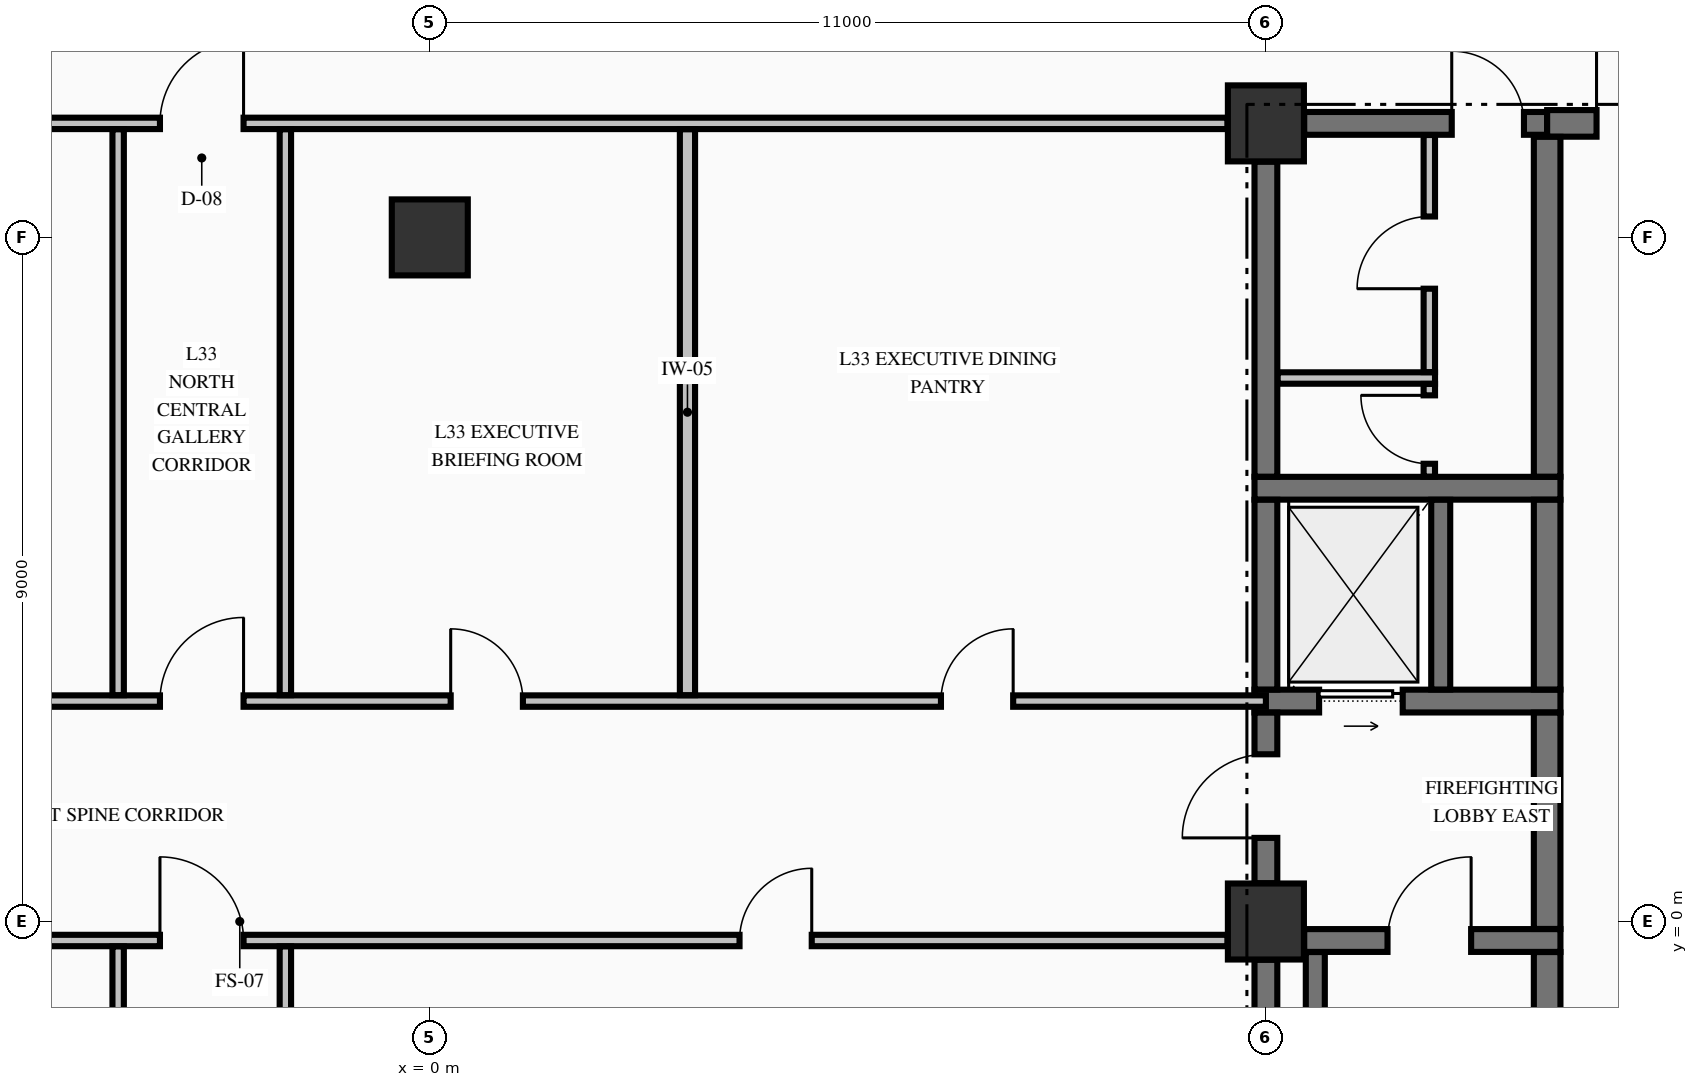
"""IFC4 building model, lengths in metres.
Left out: names, types, materials, properties, quantities, classifications, styles, units other than length and angle.
Written with IfcOpenShell. Run it as: python <this file> out.ifc"""

import sys

from ifc_helpers import new_model, si_unit, direction, frame, frame_2d, origin, origin_2d, place, context, subcontext, project, spatial, rectangle, extrude, element, fill, save


model = new_model("IFC4")
c1 = context("Model", 3, precision=1e-05, world=origin(), true_north=direction((0.0, 1.0)))
c2 = subcontext(c1, "Body", "Model", "MODEL_VIEW")
j1 = project(units=[si_unit("LENGTHUNIT", "METRE"), si_unit("PLANEANGLEUNIT", "RADIAN")], contexts=[c1])
p1 = place(None, origin())
s1 = spatial("IfcSite", under=j1, at=p1, CompositionType="ELEMENT")
p2 = place(p1, origin())
s2 = spatial("IfcBuilding", under=s1, at=p2, CompositionType="ELEMENT")
p3 = place(p2, frame((0.0, 0.0, 132.06)))
s3 = spatial("IfcBuildingStorey", under=s2, at=p3, CompositionType="ELEMENT", Elevation=132.06)
for number, where, z_axis, x_axis in (
    (1, (11.0, 0.0, -0.25), (0.0, 0.0, 1.0), (1.0, 0.0, 0.0)),
    (2, (11.0, 10.5, -0.25), (0.0, 0.0, 1.0), (1.0, 0.0, 0.0)),
    (3, (0.0, 9.0, -0.25), (0.0, 0.0, 1.0), (1.0, 0.0, 0.0)),
):
    element("IfcColumn", number, at=place(p3, frame(where, z_axis=z_axis, x_axis=x_axis)), inside=s3, PredefinedType="COLUMN", context=c2, shape_type="SweptSolid", body=[
        extrude(rectangle(XDim=1.0, YDim=1.0, at=origin_2d()), origin(), (0.0, 0.0, 1.0), 3.57),
    ])
p4 = place(p3, frame((11.504, -0.25, 0.0), z_axis=(0.0, 0.0, 1.0), x_axis=(1.0, 0.0, 0.0)))
e4 = element("IfcWall", 4, at=p4, inside=s3, PredefinedType="SHEAR", context=c2, shape_type="SweptSolid", body=[
    extrude(rectangle(XDim=3.371, YDim=0.3, at=frame_2d((1.686, 0.0))), origin(), (0.0, 0.0, 1.0), 3.32),
])
p5 = place(p4, frame((1.096, 0.0, 0.0)))
e5 = element("IfcOpeningElement", 5, at=p5, cuts=e4, PredefinedType="OPENING", context=c2, shape_type="SweptSolid", body=[
    extrude(rectangle(XDim=1.1, YDim=2.15, at=frame_2d((0.55, 1.075))), frame((0.0, 0.16, 0.0), z_axis=(0.0, -1.0, 0.0), x_axis=(1.0, 0.0, 0.0)), (0.0, 0.0, 1.0), 0.32),
])
p6 = place(p3, frame((10.85, 2.9, 0.0), z_axis=(0.0, 0.0, 1.0), x_axis=(1.0, 0.0, 0.0)))
e6 = element("IfcWall", 6, at=p6, inside=s3, PredefinedType="SHEAR", context=c2, shape_type="SweptSolid", body=[
    extrude(rectangle(XDim=4.025, YDim=0.3, at=frame_2d((2.012, 0.0))), origin(), (0.0, 0.0, 1.0), 3.32),
])
p7 = place(p6, frame((0.85, 0.0, 0.0)))
e7 = element("IfcOpeningElement", 7, at=p7, cuts=e6, PredefinedType="OPENING", context=c2, shape_type="SweptSolid", body=[
    extrude(rectangle(XDim=1.1, YDim=2.2, at=frame_2d((0.55, 1.1))), frame((0.0, 0.16, 0.0), z_axis=(0.0, -1.0, 0.0), x_axis=(1.0, 0.0, 0.0)), (0.0, 0.0, 1.0), 0.32),
])
p8 = place(p3, frame((10.85, 5.7, 0.0), z_axis=(0.0, 0.0, 1.0), x_axis=(1.0, 0.0, 0.0)))
e8 = element("IfcWall", 8, at=p8, inside=s3, PredefinedType="SHEAR", context=c2, shape_type="SweptSolid", body=[
    extrude(rectangle(XDim=4.025, YDim=0.3, at=frame_2d((2.012, 0.0))), origin(), (0.0, 0.0, 1.0), 3.32),
])
p9 = place(p3, frame((11.504, 10.5, 0.0), z_axis=(0.0, 0.0, 1.0), x_axis=(1.0, 0.0, 0.0)))
e9 = element("IfcWall", 9, at=p9, inside=s3, PredefinedType="SHEAR", context=c2, shape_type="SweptSolid", body=[
    extrude(rectangle(XDim=3.196, YDim=0.3, at=frame_2d((1.598, 0.0))), origin(), (0.0, 0.0, 1.0), 3.32),
])
p10 = place(p9, frame((1.941, 0.0, 0.0)))
e10 = element("IfcOpeningElement", 10, at=p10, cuts=e9, PredefinedType="OPENING", context=c2, shape_type="SweptSolid", body=[
    extrude(rectangle(XDim=0.95, YDim=2.15, at=frame_2d((0.475, 1.075))), frame((0.0, 0.16, 0.0), z_axis=(0.0, -1.0, 0.0), x_axis=(1.0, 0.0, 0.0)), (0.0, 0.0, 1.0), 0.32),
])
p11 = place(p3, frame((14.7, 10.5, 0.0), z_axis=(0.0, 0.0, 1.0), x_axis=(1.0, 0.0, 0.0)))
e11 = element("IfcWall", 11, at=p11, inside=s3, PredefinedType="SHEAR", context=c2, shape_type="SweptSolid", body=[
    extrude(rectangle(XDim=4.796, YDim=0.35, at=frame_2d((2.398, 0.0))), origin(), (0.0, 0.0, 1.0), 3.32),
])
p12 = place(p11, frame((0.65, 0.0, 0.0)))
e12 = element("IfcOpeningElement", 12, at=p12, cuts=e11, PredefinedType="OPENING", context=c2, shape_type="SweptSolid", body=[
    extrude(rectangle(XDim=1.2, YDim=2.15, at=frame_2d((0.6, 1.075))), frame((0.0, 0.185, 0.0), z_axis=(0.0, -1.0, 0.0), x_axis=(1.0, 0.0, 0.0)), (0.0, 0.0, 1.0), 0.37),
])
p13 = place(p11, frame((3.225, 0.0, 0.0)))
e13 = element("IfcOpeningElement", 13, at=p13, cuts=e11, PredefinedType="OPENING", context=c2, shape_type="SweptSolid", body=[
    extrude(rectangle(XDim=0.95, YDim=2.15, at=frame_2d((0.475, 1.075))), frame((0.0, 0.185, 0.0), z_axis=(0.0, -1.0, 0.0), x_axis=(1.0, 0.0, 0.0)), (0.0, 0.0, 1.0), 0.37),
])
p14 = place(p3, frame((-10.494, -0.25, 0.0), z_axis=(0.0, 0.0, 1.0), x_axis=(1.0, 0.0, 0.0)))
e14 = element("IfcWall", 14, at=p14, inside=s3, PredefinedType="PARTITIONING", context=c2, shape_type="SweptSolid", body=[
    extrude(rectangle(XDim=20.988, YDim=0.15, at=frame_2d((10.494, 0.0))), origin(), (0.0, 0.0, 1.0), 3.32),
])
p15 = place(p14, frame((6.944, 0.0, 0.0)))
e15 = element("IfcOpeningElement", 15, at=p15, cuts=e14, PredefinedType="OPENING", context=c2, shape_type="SweptSolid", body=[
    extrude(rectangle(XDim=1.1, YDim=2.15, at=frame_2d((0.55, 1.075))), frame((0.0, 0.085, 0.0), z_axis=(0.0, -1.0, 0.0), x_axis=(1.0, 0.0, 0.0)), (0.0, 0.0, 1.0), 0.17),
])
p16 = place(p14, frame((2.419, 0.0, 0.0)))
e16 = element("IfcOpeningElement", 16, at=p16, cuts=e14, PredefinedType="OPENING", context=c2, shape_type="SweptSolid", body=[
    extrude(rectangle(XDim=1.05, YDim=2.15, at=frame_2d((0.525, 1.075))), frame((0.0, 0.085, 0.0), z_axis=(0.0, -1.0, 0.0), x_axis=(1.0, 0.0, 0.0)), (0.0, 0.0, 1.0), 0.17),
])
p17 = place(p14, frame((14.569, 0.0, 0.0)))
e17 = element("IfcOpeningElement", 17, at=p17, cuts=e14, PredefinedType="OPENING", context=c2, shape_type="SweptSolid", body=[
    extrude(rectangle(XDim=0.95, YDim=2.15, at=frame_2d((0.475, 1.075))), frame((0.0, 0.085, 0.0), z_axis=(0.0, -1.0, 0.0), x_axis=(1.0, 0.0, 0.0)), (0.0, 0.0, 1.0), 0.17),
])
p18 = place(p3, frame((-11.0, 2.9, 0.0), z_axis=(0.0, 0.0, 1.0), x_axis=(1.0, 0.0, 0.0)))
e18 = element("IfcWall", 18, at=p18, inside=s3, PredefinedType="PARTITIONING", context=c2, shape_type="SweptSolid", body=[
    extrude(rectangle(XDim=22.0, YDim=0.15, at=frame_2d((11.0, 0.0))), origin(), (0.0, 0.0, 1.0), 3.32),
])
p19 = place(p18, frame((7.45, 0.0, 0.0)))
e19 = element("IfcOpeningElement", 19, at=p19, cuts=e18, PredefinedType="OPENING", context=c2, shape_type="SweptSolid", body=[
    extrude(rectangle(XDim=1.1, YDim=2.15, at=frame_2d((0.55, 1.075))), frame((0.0, 0.085, 0.0), z_axis=(0.0, -1.0, 0.0), x_axis=(1.0, 0.0, 0.0)), (0.0, 0.0, 1.0), 0.17),
])
p20 = place(p18, frame((2.925, 0.0, 0.0)))
e20 = element("IfcOpeningElement", 20, at=p20, cuts=e18, PredefinedType="OPENING", context=c2, shape_type="SweptSolid", body=[
    extrude(rectangle(XDim=1.05, YDim=2.15, at=frame_2d((0.525, 1.075))), frame((0.0, 0.085, 0.0), z_axis=(0.0, -1.0, 0.0), x_axis=(1.0, 0.0, 0.0)), (0.0, 0.0, 1.0), 0.17),
])
p21 = place(p18, frame((11.275, 0.0, 0.0)))
e21 = element("IfcOpeningElement", 21, at=p21, cuts=e18, PredefinedType="OPENING", context=c2, shape_type="SweptSolid", body=[
    extrude(rectangle(XDim=0.95, YDim=2.15, at=frame_2d((0.475, 1.075))), frame((0.0, 0.085, 0.0), z_axis=(0.0, -1.0, 0.0), x_axis=(1.0, 0.0, 0.0)), (0.0, 0.0, 1.0), 0.17),
])
p22 = place(p18, frame((17.725, 0.0, 0.0)))
e22 = element("IfcOpeningElement", 22, at=p22, cuts=e18, PredefinedType="OPENING", context=c2, shape_type="SweptSolid", body=[
    extrude(rectangle(XDim=0.95, YDim=2.15, at=frame_2d((0.475, 1.075))), frame((0.0, 0.085, 0.0), z_axis=(0.0, -1.0, 0.0), x_axis=(1.0, 0.0, 0.0)), (0.0, 0.0, 1.0), 0.17),
])
p23 = place(p3, frame((11.153, 7.15, 0.0), z_axis=(0.0, 0.0, 1.0), x_axis=(1.0, 0.0, 0.0)))
e23 = element("IfcWall", 23, at=p23, inside=s3, PredefinedType="PARTITIONING", context=c2, shape_type="SweptSolid", body=[
    extrude(rectangle(XDim=2.072, YDim=0.15, at=frame_2d((1.036, 0.0))), origin(), (0.0, 0.0, 1.0), 3.32),
])
p24 = place(p3, frame((-10.494, 10.5, 0.0), z_axis=(0.0, 0.0, 1.0), x_axis=(1.0, 0.0, 0.0)))
e24 = element("IfcWall", 24, at=p24, inside=s3, PredefinedType="PARTITIONING", context=c2, shape_type="SweptSolid", body=[
    extrude(rectangle(XDim=20.988, YDim=0.15, at=frame_2d((10.494, 0.0))), origin(), (0.0, 0.0, 1.0), 3.32),
])
p25 = place(p24, frame((6.944, 0.0, 0.0)))
e25 = element("IfcOpeningElement", 25, at=p25, cuts=e24, PredefinedType="OPENING", context=c2, shape_type="SweptSolid", body=[
    extrude(rectangle(XDim=1.1, YDim=2.15, at=frame_2d((0.55, 1.075))), frame((0.0, 0.085, 0.0), z_axis=(0.0, -1.0, 0.0), x_axis=(1.0, 0.0, 0.0)), (0.0, 0.0, 1.0), 0.17),
])
p26 = place(p3, frame((11.0, -9.446, 0.0), z_axis=(0.0, 0.0, 1.0), x_axis=(0.0, 1.0, 0.0)))
e26 = element("IfcWall", 26, at=p26, inside=s3, PredefinedType="SHEAR", context=c2, shape_type="SweptSolid", body=[
    extrude(rectangle(XDim=8.942, YDim=0.3, at=frame_2d((4.471, 0.0))), origin(), (0.0, 0.0, 1.0), 3.32),
])
p27 = place(p3, frame((11.0, 0.504, 0.0), z_axis=(0.0, 0.0, 1.0), x_axis=(0.0, 1.0, 0.0)))
e27 = element("IfcWall", 27, at=p27, inside=s3, PredefinedType="SHEAR", context=c2, shape_type="SweptSolid", body=[
    extrude(rectangle(XDim=2.244, YDim=0.3, at=frame_2d((1.122, 0.0))), origin(), (0.0, 0.0, 1.0), 3.32),
])
p28 = place(p27, frame((0.596, 0.0, 0.0)))
e28 = element("IfcOpeningElement", 28, at=p28, cuts=e27, PredefinedType="OPENING", context=c2, shape_type="SweptSolid", body=[
    extrude(rectangle(XDim=1.1, YDim=2.15, at=frame_2d((0.55, 1.075))), frame((0.0, 0.16, 0.0), z_axis=(0.0, -1.0, 0.0), x_axis=(1.0, 0.0, 0.0)), (0.0, 0.0, 1.0), 0.32),
])
p29 = place(p3, frame((11.0, 3.052, 0.0), z_axis=(0.0, 0.0, 1.0), x_axis=(0.0, 1.0, 0.0)))
e29 = element("IfcWall", 29, at=p29, inside=s3, PredefinedType="SHEAR", context=c2, shape_type="SweptSolid", body=[
    extrude(rectangle(XDim=2.496, YDim=0.3, at=frame_2d((1.248, 0.0))), origin(), (0.0, 0.0, 1.0), 3.32),
])
p30 = place(p3, frame((11.0, 5.852, 0.0), z_axis=(0.0, 0.0, 1.0), x_axis=(0.0, 1.0, 0.0)))
e30 = element("IfcWall", 30, at=p30, inside=s3, PredefinedType="SHEAR", context=c2, shape_type="SweptSolid", body=[
    extrude(rectangle(XDim=4.144, YDim=0.3, at=frame_2d((2.072, 0.0))), origin(), (0.0, 0.0, 1.0), 3.32),
])
p31 = place(p3, frame((11.65, -9.798, 0.0), z_axis=(0.0, 0.0, 1.0), x_axis=(0.0, 1.0, 0.0)))
e31 = element("IfcWall", 31, at=p31, inside=s3, PredefinedType="SOLIDWALL", context=c2, shape_type="SweptSolid", body=[
    extrude(rectangle(XDim=9.396, YDim=0.25, at=frame_2d((4.698, 0.0))), origin(), (0.0, 0.0, 1.0), 3.32),
])
p32 = place(p3, frame((13.3, 3.052, 0.0), z_axis=(0.0, 0.0, 1.0), x_axis=(0.0, 1.0, 0.0)))
e32 = element("IfcWall", 32, at=p32, inside=s3, PredefinedType="SOLIDWALL", context=c2, shape_type="SweptSolid", body=[
    extrude(rectangle(XDim=2.496, YDim=0.25, at=frame_2d((1.248, 0.0))), origin(), (0.0, 0.0, 1.0), 3.32),
])
p33 = place(p3, frame((14.7, -9.773, 0.0), z_axis=(0.0, 0.0, 1.0), x_axis=(0.0, 1.0, 0.0)))
e33 = element("IfcWall", 33, at=p33, inside=s3, PredefinedType="SHEAR", context=c2, shape_type="SweptSolid", body=[
    extrude(rectangle(XDim=9.371, YDim=0.35, at=frame_2d((4.686, 0.0))), origin(), (0.0, 0.0, 1.0), 3.32),
])
p34 = place(p3, frame((14.7, -0.098, 0.0), z_axis=(0.0, 0.0, 1.0), x_axis=(0.0, 1.0, 0.0)))
e34 = element("IfcWall", 34, at=p34, inside=s3, PredefinedType="SHEAR", context=c2, shape_type="SweptSolid", body=[
    extrude(rectangle(XDim=2.846, YDim=0.35, at=frame_2d((1.423, 0.0))), origin(), (0.0, 0.0, 1.0), 3.32),
])
p35 = place(p3, frame((14.7, 3.052, 0.0), z_axis=(0.0, 0.0, 1.0), x_axis=(0.0, 1.0, 0.0)))
e35 = element("IfcWall", 35, at=p35, inside=s3, PredefinedType="SHEAR", context=c2, shape_type="SweptSolid", body=[
    extrude(rectangle(XDim=2.496, YDim=0.35, at=frame_2d((1.248, 0.0))), origin(), (0.0, 0.0, 1.0), 3.32),
])
p36 = place(p3, frame((14.7, 5.852, 0.0), z_axis=(0.0, 0.0, 1.0), x_axis=(0.0, 1.0, 0.0)))
e36 = element("IfcWall", 36, at=p36, inside=s3, PredefinedType="SHEAR", context=c2, shape_type="SweptSolid", body=[
    extrude(rectangle(XDim=4.471, YDim=0.35, at=frame_2d((2.235, 0.0))), origin(), (0.0, 0.0, 1.0), 3.32),
])
p37 = place(p3, frame((-4.1, -9.872, 0.0), z_axis=(0.0, 0.0, 1.0), x_axis=(0.0, 1.0, 0.0)))
e37 = element("IfcWall", 37, at=p37, inside=s3, PredefinedType="PARTITIONING", context=c2, shape_type="SweptSolid", body=[
    extrude(rectangle(XDim=9.544, YDim=0.15, at=frame_2d((4.772, 0.0))), origin(), (0.0, 0.0, 1.0), 3.32),
])
p38 = place(p3, frame((-4.1, 2.978, 0.0), z_axis=(0.0, 0.0, 1.0), x_axis=(0.0, 1.0, 0.0)))
e38 = element("IfcWall", 38, at=p38, inside=s3, PredefinedType="PARTITIONING", context=c2, shape_type="SweptSolid", body=[
    extrude(rectangle(XDim=7.444, YDim=0.15, at=frame_2d((3.722, 0.0))), origin(), (0.0, 0.0, 1.0), 3.32),
])
p39 = place(p3, frame((-1.9, -4.747, 0.0), z_axis=(0.0, 0.0, 1.0), x_axis=(0.0, 1.0, 0.0)))
e39 = element("IfcWall", 39, at=p39, inside=s3, PredefinedType="PARTITIONING", context=c2, shape_type="SweptSolid", body=[
    extrude(rectangle(XDim=4.419, YDim=0.15, at=frame_2d((2.209, 0.0))), origin(), (0.0, 0.0, 1.0), 3.32),
])
p40 = place(p3, frame((-1.9, 2.978, 0.0), z_axis=(0.0, 0.0, 1.0), x_axis=(0.0, 1.0, 0.0)))
e40 = element("IfcWall", 40, at=p40, inside=s3, PredefinedType="PARTITIONING", context=c2, shape_type="SweptSolid", body=[
    extrude(rectangle(XDim=7.444, YDim=0.15, at=frame_2d((3.722, 0.0))), origin(), (0.0, 0.0, 1.0), 3.32),
])
p41 = place(p3, frame((3.39, 2.978, 0.0), z_axis=(0.0, 0.0, 1.0), x_axis=(0.0, 1.0, 0.0)))
e41 = element("IfcWall", 41, at=p41, inside=s3, PredefinedType="PARTITIONING", context=c2, shape_type="SweptSolid", body=[
    extrude(rectangle(XDim=7.444, YDim=0.2, at=frame_2d((3.722, 0.0))), origin(), (0.0, 0.0, 1.0), 3.32),
])
p42 = place(p3, frame((13.15, 5.853, 0.0), z_axis=(0.0, 0.0, 1.0), x_axis=(0.0, 1.0, 0.0)))
e42 = element("IfcWall", 42, at=p42, inside=s3, PredefinedType="PARTITIONING", context=c2, shape_type="SweptSolid", body=[
    extrude(rectangle(XDim=1.219, YDim=0.15, at=frame_2d((0.609, 0.0))), origin(), (0.0, 0.0, 1.0), 3.32),
])
p43 = place(p42, frame((0.169, 0.0, 0.0)))
e43 = element("IfcOpeningElement", 43, at=p43, cuts=e42, PredefinedType="OPENING", context=c2, shape_type="SweptSolid", body=[
    extrude(rectangle(XDim=0.9, YDim=2.15, at=frame_2d((0.45, 1.075))), frame((0.0, 0.085, 0.0), z_axis=(0.0, -1.0, 0.0), x_axis=(1.0, 0.0, 0.0)), (0.0, 0.0, 1.0), 0.17),
])
p44 = place(p3, frame((13.15, 7.228, 0.0), z_axis=(0.0, 0.0, 1.0), x_axis=(0.0, 1.0, 0.0)))
e44 = element("IfcWall", 44, at=p44, inside=s3, PredefinedType="PARTITIONING", context=c2, shape_type="SweptSolid", body=[
    extrude(rectangle(XDim=3.119, YDim=0.15, at=frame_2d((1.56, 0.0))), origin(), (0.0, 0.0, 1.0), 3.32),
])
p45 = place(p44, frame((1.097, 0.0, 0.0)))
e45 = element("IfcOpeningElement", 45, at=p45, cuts=e44, PredefinedType="OPENING", context=c2, shape_type="SweptSolid", body=[
    extrude(rectangle(XDim=0.95, YDim=2.15, at=frame_2d((0.475, 1.075))), frame((0.0, 0.085, 0.0), z_axis=(0.0, -1.0, 0.0), x_axis=(1.0, 0.0, 0.0)), (0.0, 0.0, 1.0), 0.17),
])
p46 = place(p5, origin())
e46 = element("IfcDoor", 46, at=p46, inside=s3, OperationType="SINGLE_SWING_RIGHT", PredefinedType="DOOR", context=c2, shape_type="SweptSolid", body=[
    extrude(rectangle(XDim=1.1, YDim=2.15, at=frame_2d((0.55, 1.075))), frame((0.0, 0.025, 0.0), z_axis=(0.0, -1.0, 0.0), x_axis=(1.0, 0.0, 0.0)), (0.0, 0.0, 1.0), 0.05),
])
fill(e5, e46)
p47 = place(p28, origin())
e47 = element("IfcDoor", 47, at=p47, inside=s3, OperationType="SINGLE_SWING_LEFT", PredefinedType="DOOR", context=c2, shape_type="SweptSolid", body=[
    extrude(rectangle(XDim=1.1, YDim=2.15, at=frame_2d((0.55, 1.075))), frame((0.0, 0.025, 0.0), z_axis=(0.0, -1.0, 0.0), x_axis=(1.0, 0.0, 0.0)), (0.0, 0.0, 1.0), 0.05),
])
fill(e28, e47)
p48 = place(p7, origin())
e48 = element("IfcDoor", 48, at=p48, inside=s3, OperationType="SLIDING_TO_RIGHT", PredefinedType="DOOR", context=c2, shape_type="SweptSolid", body=[
    extrude(rectangle(XDim=1.1, YDim=2.2, at=frame_2d((0.55, 1.1))), frame((0.0, 0.025, 0.0), z_axis=(0.0, -1.0, 0.0), x_axis=(1.0, 0.0, 0.0)), (0.0, 0.0, 1.0), 0.05),
])
fill(e7, e48)
p49 = place(p10, origin())
e49 = element("IfcDoor", 49, at=p49, inside=s3, OperationType="SINGLE_SWING_LEFT", PredefinedType="DOOR", context=c2, shape_type="SweptSolid", body=[
    extrude(rectangle(XDim=0.95, YDim=2.15, at=frame_2d((0.475, 1.075))), frame((0.0, 0.025, 0.0), z_axis=(0.0, -1.0, 0.0), x_axis=(1.0, 0.0, 0.0)), (0.0, 0.0, 1.0), 0.05),
])
fill(e10, e49)
p50 = place(p43, origin())
e50 = element("IfcDoor", 50, at=p50, inside=s3, OperationType="SINGLE_SWING_RIGHT", PredefinedType="DOOR", context=c2, shape_type="SweptSolid", body=[
    extrude(rectangle(XDim=0.9, YDim=2.15, at=frame_2d((0.45, 1.075))), frame((0.0, 0.025, 0.0), z_axis=(0.0, -1.0, 0.0), x_axis=(1.0, 0.0, 0.0)), (0.0, 0.0, 1.0), 0.05),
])
fill(e43, e50)
p51 = place(p45, origin())
e51 = element("IfcDoor", 51, at=p51, inside=s3, OperationType="SINGLE_SWING_LEFT", PredefinedType="DOOR", context=c2, shape_type="SweptSolid", body=[
    extrude(rectangle(XDim=0.95, YDim=2.15, at=frame_2d((0.475, 1.075))), frame((0.0, 0.025, 0.0), z_axis=(0.0, -1.0, 0.0), x_axis=(1.0, 0.0, 0.0)), (0.0, 0.0, 1.0), 0.05),
])
fill(e45, e51)
p52 = place(p12, origin())
e52 = element("IfcDoor", 52, at=p52, inside=s3, OperationType="SINGLE_SWING_LEFT", PredefinedType="DOOR", context=c2, shape_type="SweptSolid", body=[
    extrude(rectangle(XDim=1.2, YDim=2.15, at=frame_2d((0.6, 1.075))), frame((0.0, 0.025, 0.0), z_axis=(0.0, -1.0, 0.0), x_axis=(1.0, 0.0, 0.0)), (0.0, 0.0, 1.0), 0.05),
])
fill(e12, e52)
p53 = place(p25, origin())
e53 = element("IfcDoor", 53, at=p53, inside=s3, OperationType="SINGLE_SWING_RIGHT", PredefinedType="DOOR", context=c2, shape_type="SweptSolid", body=[
    extrude(rectangle(XDim=1.1, YDim=2.15, at=frame_2d((0.55, 1.075))), frame((0.0, 0.025, 0.0), z_axis=(0.0, -1.0, 0.0), x_axis=(1.0, 0.0, 0.0)), (0.0, 0.0, 1.0), 0.05),
])
fill(e25, e53)
p54 = place(p19, origin())
e54 = element("IfcDoor", 54, at=p54, inside=s3, OperationType="SINGLE_SWING_RIGHT", PredefinedType="DOOR", context=c2, shape_type="SweptSolid", body=[
    extrude(rectangle(XDim=1.1, YDim=2.15, at=frame_2d((0.55, 1.075))), frame((0.0, 0.025, 0.0), z_axis=(0.0, -1.0, 0.0), x_axis=(1.0, 0.0, 0.0)), (0.0, 0.0, 1.0), 0.05),
])
fill(e19, e54)
p55 = place(p15, origin())
e55 = element("IfcDoor", 55, at=p55, inside=s3, OperationType="SINGLE_SWING_LEFT", PredefinedType="DOOR", context=c2, shape_type="SweptSolid", body=[
    extrude(rectangle(XDim=1.1, YDim=2.15, at=frame_2d((0.55, 1.075))), frame((0.0, 0.025, 0.0), z_axis=(0.0, -1.0, 0.0), x_axis=(1.0, 0.0, 0.0)), (0.0, 0.0, 1.0), 0.05),
])
fill(e15, e55)
p56 = place(p21, origin())
e56 = element("IfcDoor", 56, at=p56, inside=s3, OperationType="SINGLE_SWING_LEFT", PredefinedType="DOOR", context=c2, shape_type="SweptSolid", body=[
    extrude(rectangle(XDim=0.95, YDim=2.15, at=frame_2d((0.475, 1.075))), frame((0.0, 0.025, 0.0), z_axis=(0.0, -1.0, 0.0), x_axis=(1.0, 0.0, 0.0)), (0.0, 0.0, 1.0), 0.05),
])
fill(e21, e56)
p57 = place(p22, origin())
e57 = element("IfcDoor", 57, at=p57, inside=s3, OperationType="SINGLE_SWING_RIGHT", PredefinedType="DOOR", context=c2, shape_type="SweptSolid", body=[
    extrude(rectangle(XDim=0.95, YDim=2.15, at=frame_2d((0.475, 1.075))), frame((0.0, 0.025, 0.0), z_axis=(0.0, -1.0, 0.0), x_axis=(1.0, 0.0, 0.0)), (0.0, 0.0, 1.0), 0.05),
])
fill(e22, e57)
p58 = place(p17, origin())
e58 = element("IfcDoor", 58, at=p58, inside=s3, OperationType="SINGLE_SWING_RIGHT", PredefinedType="DOOR", context=c2, shape_type="SweptSolid", body=[
    extrude(rectangle(XDim=0.95, YDim=2.15, at=frame_2d((0.475, 1.075))), frame((0.0, 0.025, 0.0), z_axis=(0.0, -1.0, 0.0), x_axis=(1.0, 0.0, 0.0)), (0.0, 0.0, 1.0), 0.05),
])
fill(e17, e58)
save(model, sys.argv[1])
